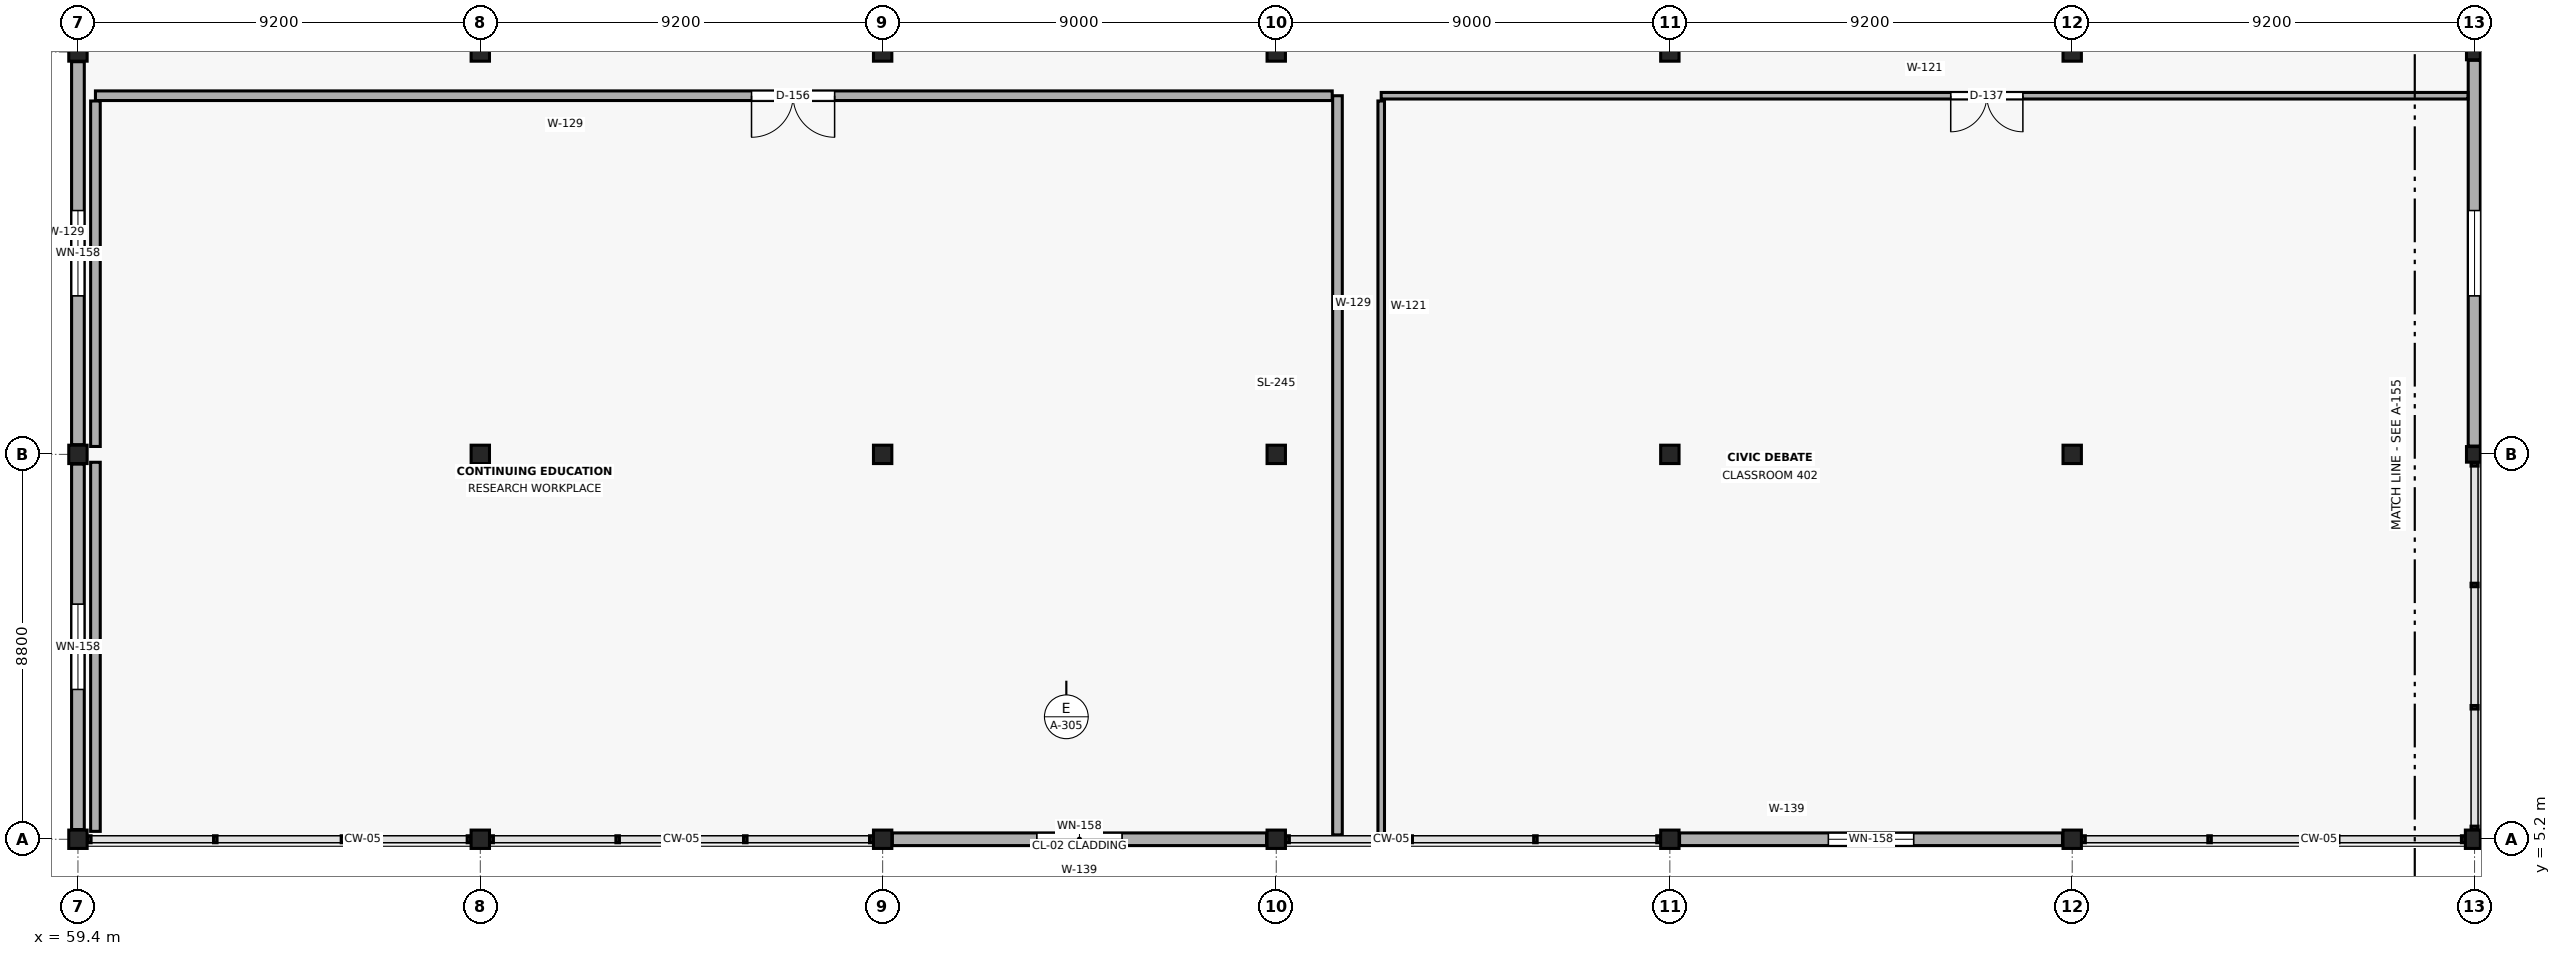
"""IFC4 building model, lengths in metres.
Left out: names, types, materials, properties, quantities, classifications, styles, units other than length and angle.
Written with IfcOpenShell. Run it as: python <this file> out.ifc"""

import sys

from ifc_helpers import new_model, si_unit, direction, frame, frame_2d, origin, origin_2d, place, context, subcontext, project, spatial, rectangle, i_section, extrude, element, fill, save


model = new_model("IFC4")
c1 = context("Model", 3, precision=1e-05, world=origin(), true_north=direction((0.0, 1.0)))
c2 = subcontext(c1, "Body", "Model", "MODEL_VIEW")
j1 = project(units=[si_unit("LENGTHUNIT", "METRE"), si_unit("PLANEANGLEUNIT", "RADIAN")], contexts=[c1])
p1 = place(None, origin())
s1 = spatial("IfcSite", under=j1, at=p1, CompositionType="ELEMENT")
p2 = place(p1, origin())
s2 = spatial("IfcBuilding", under=s1, at=p2, CompositionType="ELEMENT")
p3 = place(p2, frame((0.0, 0.0, 18.3)))
s3 = spatial("IfcBuildingStorey", under=s2, at=p3, CompositionType="ELEMENT", Elevation=18.3)
for number, where, z_axis, x_axis in (
    (1, (59.4, 5.2, 0.0), (0.0, 0.0, 1.0), (1.0, 0.0, 0.0)),
    (2, (59.4, 14.0, 0.0), (0.0, 0.0, 1.0), (1.0, 0.0, 0.0)),
    (3, (59.4, 23.2, 0.0), (0.0, 0.0, 1.0), (1.0, 0.0, 0.0)),
    (4, (68.6, 5.2, 0.0), (0.0, 0.0, 1.0), (1.0, 0.0, 0.0)),
    (5, (68.6, 14.0, 0.0), (0.0, 0.0, 1.0), (1.0, 0.0, 0.0)),
    (6, (68.6, 23.2, 0.0), (0.0, 0.0, 1.0), (1.0, 0.0, 0.0)),
    (7, (77.8, 5.2, 0.0), (0.0, 0.0, 1.0), (1.0, 0.0, 0.0)),
    (8, (77.8, 14.0, 0.0), (0.0, 0.0, 1.0), (1.0, 0.0, 0.0)),
    (9, (77.8, 23.2, 0.0), (0.0, 0.0, 1.0), (1.0, 0.0, 0.0)),
    (10, (86.8, 5.2, 0.0), (0.0, 0.0, 1.0), (1.0, 0.0, 0.0)),
    (11, (86.8, 14.0, 0.0), (0.0, 0.0, 1.0), (1.0, 0.0, 0.0)),
    (12, (86.8, 23.2, 0.0), (0.0, 0.0, 1.0), (1.0, 0.0, 0.0)),
    (13, (95.8, 5.2, 0.0), (0.0, 0.0, 1.0), (1.0, 0.0, 0.0)),
    (14, (95.8, 14.0, 0.0), (0.0, 0.0, 1.0), (1.0, 0.0, 0.0)),
    (15, (95.8, 23.2, 0.0), (0.0, 0.0, 1.0), (1.0, 0.0, 0.0)),
    (16, (105.0, 5.2, 0.0), (0.0, 0.0, 1.0), (1.0, 0.0, 0.0)),
    (17, (105.0, 14.0, 0.0), (0.0, 0.0, 1.0), (1.0, 0.0, 0.0)),
    (18, (105.0, 23.2, 0.0), (0.0, 0.0, 1.0), (1.0, 0.0, 0.0)),
    (19, (114.2, 5.2, 0.0), (0.0, 0.0, 1.0), (1.0, 0.0, 0.0)),
):
    element("IfcColumn", number, at=place(p3, frame(where, z_axis=z_axis, x_axis=x_axis)), inside=s3, PredefinedType="COLUMN", context=c2, shape_type="SweptSolid", body=[
        extrude(rectangle(XDim=0.42, YDim=0.42, at=origin_2d()), origin(), (0.0, 0.0, 1.0), 3.9),
    ])
for number, where, z_axis, x_axis in (
    (20, (114.2, 14.0, 0.0), (0.0, 0.0, 1.0), (1.0, 0.0, 0.0)),
    (21, (114.2, 23.2, 0.0), (0.0, 0.0, 1.0), (1.0, 0.0, 0.0)),
):
    element("IfcColumn", number, at=place(p3, frame(where, z_axis=z_axis, x_axis=x_axis)), inside=s3, PredefinedType="COLUMN", context=c2, shape_type="SweptSolid", body=[
        extrude(i_section(OverallWidth=0.369, OverallDepth=0.356, WebThickness=0.011, FlangeThickness=0.018, at=origin_2d()), origin(), (0.0, 0.0, 1.0), 3.9),
    ])
p4 = place(p3, frame((86.578, 5.2, 0.0), z_axis=(0.0, 0.0, 1.0), x_axis=(-1.0, 0.0, 0.0)))
e22 = element("IfcWall", 22, at=p4, inside=s3, PredefinedType="SOLIDWALL", context=c2, shape_type="SweptSolid", body=[
    extrude(rectangle(XDim=8.556, YDim=0.29, at=frame_2d((4.278, 0.0))), origin(), (0.0, 0.0, 1.0), 2.855),
])
p5 = place(p4, frame((3.303, 0.0, 0.85)))
e23 = element("IfcOpeningElement", 23, at=p5, cuts=e22, PredefinedType="OPENING", context=c2, shape_type="SweptSolid", body=[
    extrude(rectangle(XDim=1.95, YDim=1.9, at=frame_2d((0.975, 0.95))), frame((0.0, 0.157, 0.0), z_axis=(0.0, -1.0, 0.0), x_axis=(1.0, 0.0, 0.0)), (0.0, 0.0, 1.0), 0.314),
])
p6 = place(p3, frame((104.778, 5.2, 0.0), z_axis=(0.0, 0.0, 1.0), x_axis=(-1.0, 0.0, 0.0)))
e24 = element("IfcWall", 24, at=p6, inside=s3, PredefinedType="SOLIDWALL", context=c2, shape_type="SweptSolid", body=[
    extrude(rectangle(XDim=8.756, YDim=0.29, at=frame_2d((4.378, 0.0))), origin(), (0.0, 0.0, 1.0), 2.855),
])
p7 = place(p6, frame((3.403, 0.0, 0.85)))
e25 = element("IfcOpeningElement", 25, at=p7, cuts=e24, PredefinedType="OPENING", context=c2, shape_type="SweptSolid", body=[
    extrude(rectangle(XDim=1.95, YDim=1.9, at=frame_2d((0.975, 0.95))), frame((0.0, 0.157, 0.0), z_axis=(0.0, -1.0, 0.0), x_axis=(1.0, 0.0, 0.0)), (0.0, 0.0, 1.0), 0.314),
])
p8 = place(p3, frame((59.4, 5.422, 0.0), z_axis=(0.0, 0.0, 1.0), x_axis=(0.0, 1.0, 0.0)))
e26 = element("IfcWall", 26, at=p8, inside=s3, PredefinedType="SOLIDWALL", context=c2, shape_type="SweptSolid", body=[
    extrude(rectangle(XDim=8.356, YDim=0.29, at=frame_2d((4.178, 0.0))), origin(), (0.0, 0.0, 1.0), 2.855),
])
p9 = place(p8, frame((3.203, 0.0, 0.85)))
e27 = element("IfcOpeningElement", 27, at=p9, cuts=e26, PredefinedType="OPENING", context=c2, shape_type="SweptSolid", body=[
    extrude(rectangle(XDim=1.95, YDim=1.9, at=frame_2d((0.975, 0.95))), frame((0.0, 0.157, 0.0), z_axis=(0.0, -1.0, 0.0), x_axis=(1.0, 0.0, 0.0)), (0.0, 0.0, 1.0), 0.314),
])
p10 = place(p3, frame((59.4, 14.222, 0.0), z_axis=(0.0, 0.0, 1.0), x_axis=(0.0, 1.0, 0.0)))
e28 = element("IfcWall", 28, at=p10, inside=s3, PredefinedType="SOLIDWALL", context=c2, shape_type="SweptSolid", body=[
    extrude(rectangle(XDim=8.756, YDim=0.29, at=frame_2d((4.378, 0.0))), origin(), (0.0, 0.0, 1.0), 2.855),
])
p11 = place(p10, frame((3.403, 0.0, 0.85)))
e29 = element("IfcOpeningElement", 29, at=p11, cuts=e28, PredefinedType="OPENING", context=c2, shape_type="SweptSolid", body=[
    extrude(rectangle(XDim=1.95, YDim=1.9, at=frame_2d((0.975, 0.95))), frame((0.0, 0.157, 0.0), z_axis=(0.0, -1.0, 0.0), x_axis=(1.0, 0.0, 0.0)), (0.0, 0.0, 1.0), 0.314),
])
p12 = place(p3, frame((114.2, 23.01, 0.0), z_axis=(0.0, 0.0, 1.0), x_axis=(0.0, -1.0, 0.0)))
e30 = element("IfcWall", 30, at=p12, inside=s3, PredefinedType="SOLIDWALL", context=c2, shape_type="SweptSolid", body=[
    extrude(rectangle(XDim=8.82, YDim=0.29, at=frame_2d((4.41, 0.0))), origin(), (0.0, 0.0, 1.0), 2.855),
])
p13 = place(p12, frame((3.435, 0.0, 0.85)))
e31 = element("IfcOpeningElement", 31, at=p13, cuts=e30, PredefinedType="OPENING", context=c2, shape_type="SweptSolid", body=[
    extrude(rectangle(XDim=1.95, YDim=1.9, at=frame_2d((0.975, 0.95))), frame((0.0, 0.157, 0.0), z_axis=(0.0, -1.0, 0.0), x_axis=(1.0, 0.0, 0.0)), (0.0, 0.0, 1.0), 0.314),
])
p14 = place(p3, frame((88.2, 5.3, 0.0), z_axis=(0.0, 0.0, 1.0), x_axis=(0.0, 1.0, 0.0)))
e32 = element("IfcWall", 32, at=p14, inside=s3, PredefinedType="PARTITIONING", context=c2, shape_type="SweptSolid", body=[
    extrude(rectangle(XDim=16.9, YDim=0.22, at=frame_2d((8.45, 0.0))), origin(), (0.0, 0.0, 1.0), 3.655),
])
p15 = place(p3, frame((88.08, 22.2, 0.0), z_axis=(0.0, 0.0, 1.0), x_axis=(-1.0, 0.0, 0.0)))
e33 = element("IfcWall", 33, at=p15, inside=s3, PredefinedType="PARTITIONING", context=c2, shape_type="SweptSolid", body=[
    extrude(rectangle(XDim=28.28, YDim=0.22, at=frame_2d((14.14, 0.0))), origin(), (0.0, 0.0, 1.0), 3.655),
])
p16 = place(p15, frame((11.378, 0.0, 0.0)))
e34 = element("IfcOpeningElement", 34, at=p16, cuts=e33, PredefinedType="OPENING", context=c2, shape_type="SweptSolid", body=[
    extrude(rectangle(XDim=1.9, YDim=2.45, at=frame_2d((0.95, 1.225))), frame((0.0, 0.122, 0.0), z_axis=(0.0, -1.0, 0.0), x_axis=(1.0, 0.0, 0.0)), (0.0, 0.0, 1.0), 0.244),
])
p17 = place(p3, frame((59.8, 22.08, 0.0), z_axis=(0.0, 0.0, 1.0), x_axis=(0.0, -1.0, 0.0)))
e35 = element("IfcWall", 35, at=p17, inside=s3, PredefinedType="PARTITIONING", context=c2, shape_type="SweptSolid", body=[
    extrude(rectangle(XDim=7.899, YDim=0.22, at=frame_2d((3.95, 0.0))), origin(), (0.0, 0.0, 1.0), 3.655),
])
p18 = place(p3, frame((59.8, 13.819, 0.0), z_axis=(0.0, 0.0, 1.0), x_axis=(0.0, -1.0, 0.0)))
e36 = element("IfcWall", 36, at=p18, inside=s3, PredefinedType="PARTITIONING", context=c2, shape_type="SweptSolid", body=[
    extrude(rectangle(XDim=8.439, YDim=0.22, at=frame_2d((4.219, 0.0))), origin(), (0.0, 0.0, 1.0), 3.655),
])
p19 = place(p3, frame((114.05, 22.2, 0.0), z_axis=(0.0, 0.0, 1.0), x_axis=(-1.0, 0.0, 0.0)))
e37 = element("IfcWall", 37, at=p19, inside=s3, PredefinedType="PARTITIONING", context=c2, shape_type="SweptSolid", body=[
    extrude(rectangle(XDim=24.85, YDim=0.15, at=frame_2d((12.425, 0.0))), origin(), (0.0, 0.0, 1.0), 3.655),
])
p20 = place(p19, frame((10.178, 0.0, 0.0)))
e38 = element("IfcOpeningElement", 38, at=p20, cuts=e37, PredefinedType="OPENING", context=c2, shape_type="SweptSolid", body=[
    extrude(rectangle(XDim=1.65, YDim=2.35, at=frame_2d((0.825, 1.175))), frame((0.0, 0.087, 0.0), z_axis=(0.0, -1.0, 0.0), x_axis=(1.0, 0.0, 0.0)), (0.0, 0.0, 1.0), 0.174),
])
p21 = place(p3, frame((89.2, 22.08, 0.0), z_axis=(0.0, 0.0, 1.0), x_axis=(0.0, -1.0, 0.0)))
e39 = element("IfcWall", 39, at=p21, inside=s3, PredefinedType="PARTITIONING", context=c2, shape_type="SweptSolid", body=[
    extrude(rectangle(XDim=16.78, YDim=0.15, at=frame_2d((8.39, 0.0))), origin(), (0.0, 0.0, 1.0), 3.655),
])
p22 = place(p5, origin())
e40 = element("IfcWindow", 40, at=p22, inside=s3, PartitioningType="SINGLE_PANEL", PredefinedType="WINDOW", context=c2, shape_type="SweptSolid", body=[
    extrude(rectangle(XDim=1.95, YDim=1.9, at=frame_2d((0.975, 0.95))), frame((0.0, 0.03, 0.0), z_axis=(0.0, -1.0, 0.0), x_axis=(1.0, 0.0, 0.0)), (0.0, 0.0, 1.0), 0.06),
])
fill(e23, e40)
p23 = place(p7, origin())
e41 = element("IfcWindow", 41, at=p23, inside=s3, PartitioningType="SINGLE_PANEL", PredefinedType="WINDOW", context=c2, shape_type="SweptSolid", body=[
    extrude(rectangle(XDim=1.95, YDim=1.9, at=frame_2d((0.975, 0.95))), frame((0.0, 0.03, 0.0), z_axis=(0.0, -1.0, 0.0), x_axis=(1.0, 0.0, 0.0)), (0.0, 0.0, 1.0), 0.06),
])
fill(e25, e41)
p24 = place(p9, origin())
e42 = element("IfcWindow", 42, at=p24, inside=s3, PartitioningType="SINGLE_PANEL", PredefinedType="WINDOW", context=c2, shape_type="SweptSolid", body=[
    extrude(rectangle(XDim=1.95, YDim=1.9, at=frame_2d((0.975, 0.95))), frame((0.0, 0.03, 0.0), z_axis=(0.0, -1.0, 0.0), x_axis=(1.0, 0.0, 0.0)), (0.0, 0.0, 1.0), 0.06),
])
fill(e27, e42)
p25 = place(p11, origin())
e43 = element("IfcWindow", 43, at=p25, inside=s3, PartitioningType="SINGLE_PANEL", PredefinedType="WINDOW", context=c2, shape_type="SweptSolid", body=[
    extrude(rectangle(XDim=1.95, YDim=1.9, at=frame_2d((0.975, 0.95))), frame((0.0, 0.03, 0.0), z_axis=(0.0, -1.0, 0.0), x_axis=(1.0, 0.0, 0.0)), (0.0, 0.0, 1.0), 0.06),
])
fill(e29, e43)
p26 = place(p13, origin())
e44 = element("IfcWindow", 44, at=p26, inside=s3, PartitioningType="SINGLE_PANEL", PredefinedType="WINDOW", context=c2, shape_type="SweptSolid", body=[
    extrude(rectangle(XDim=1.95, YDim=1.9, at=frame_2d((0.975, 0.95))), frame((0.0, 0.03, 0.0), z_axis=(0.0, -1.0, 0.0), x_axis=(1.0, 0.0, 0.0)), (0.0, 0.0, 1.0), 0.06),
])
fill(e31, e44)
p27 = place(p16, origin())
e45 = element("IfcDoor", 45, at=p27, inside=s3, OperationType="DOUBLE_DOOR_SINGLE_SWING", PredefinedType="DOOR", context=c2, shape_type="SweptSolid", body=[
    extrude(rectangle(XDim=1.9, YDim=2.45, at=frame_2d((0.95, 1.225))), frame((0.0, 0.025, 0.0), z_axis=(0.0, -1.0, 0.0), x_axis=(1.0, 0.0, 0.0)), (0.0, 0.0, 1.0), 0.05),
])
fill(e34, e45)
p28 = place(p20, origin())
e46 = element("IfcDoor", 46, at=p28, inside=s3, OperationType="DOUBLE_DOOR_SINGLE_SWING", PredefinedType="DOOR", context=c2, shape_type="SweptSolid", body=[
    extrude(rectangle(XDim=1.65, YDim=2.35, at=frame_2d((0.825, 1.175))), frame((0.0, 0.025, 0.0), z_axis=(0.0, -1.0, 0.0), x_axis=(1.0, 0.0, 0.0)), (0.0, 0.0, 1.0), 0.05),
])
fill(e38, e46)
save(model, sys.argv[1])
